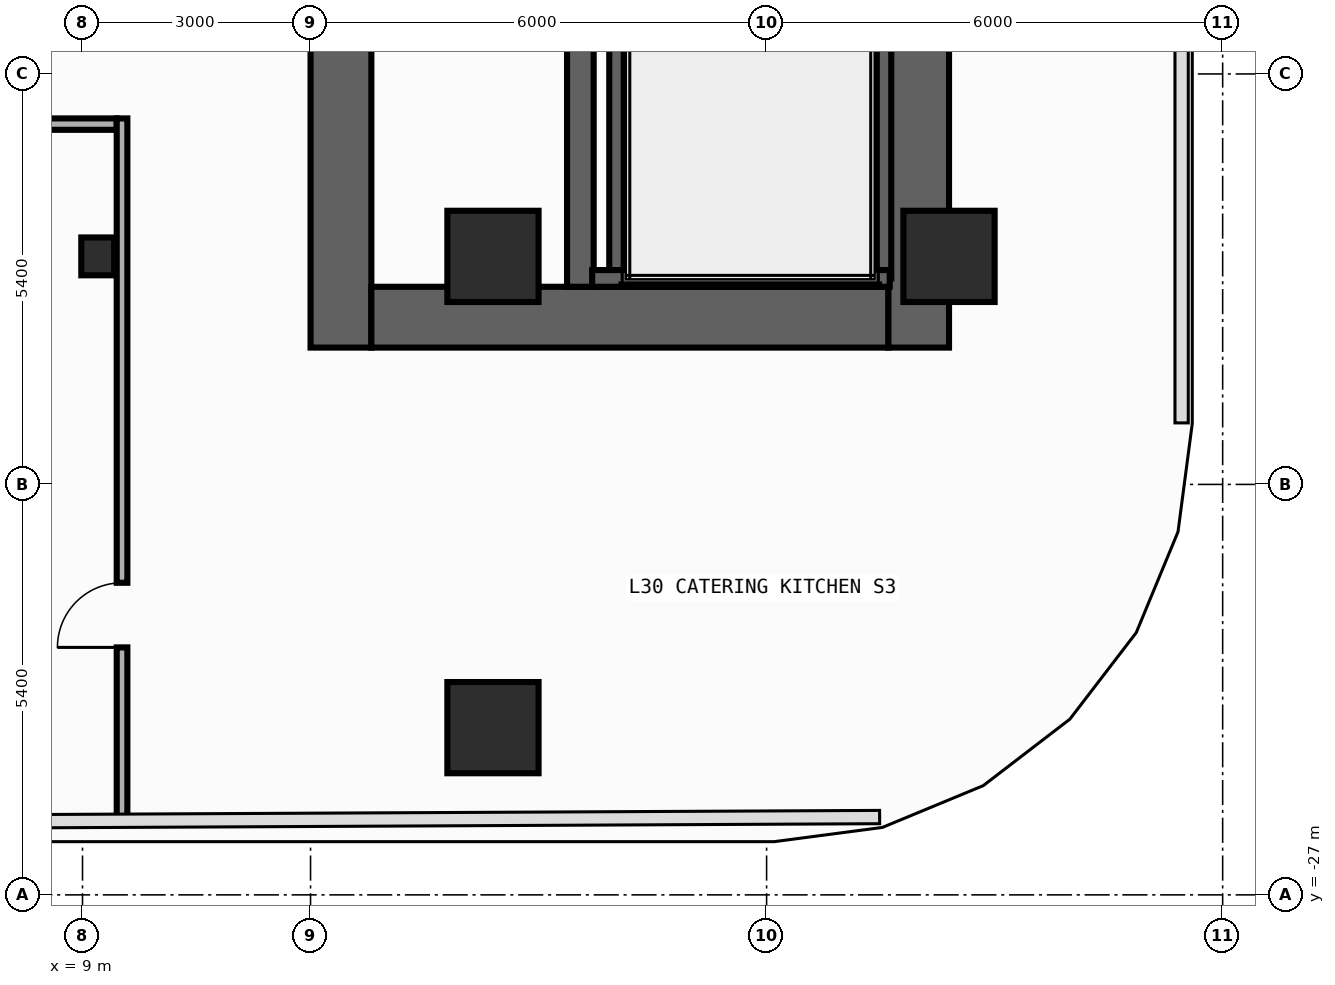
"""IFC4 building model, lengths in metres.
Left out: names, types, materials, properties, quantities, classifications, styles, units other than length and angle.
Written with IfcOpenShell. Run it as: python <this file> out.ifc"""

import sys

from ifc_helpers import new_model, si_unit, direction, frame, frame_2d, origin, origin_2d, place, context, subcontext, project, spatial, rectangle, i_section, extrude, element, fill, save


model = new_model("IFC4")
c1 = context("Model", 3, precision=1e-05, world=origin(), true_north=direction((0.0, 1.0)))
c2 = subcontext(c1, "Body", "Model", "MODEL_VIEW")
j1 = project(units=[si_unit("LENGTHUNIT", "METRE"), si_unit("PLANEANGLEUNIT", "RADIAN")], contexts=[c1])
p1 = place(None, origin())
s1 = spatial("IfcSite", under=j1, at=p1, CompositionType="ELEMENT")
p2 = place(p1, origin())
s2 = spatial("IfcBuilding", under=s1, at=p2, CompositionType="ELEMENT")
p3 = place(p2, frame((0.0, 0.0, 131.0)))
s3 = spatial("IfcBuildingStorey", under=s2, at=p3, CompositionType="ELEMENT", Elevation=131.0)
p4 = place(p3, frame((12.4, -19.8, 0.0), z_axis=(0.0, 0.0, 1.0), x_axis=(0.0, 1.0, 0.0)))
e1 = element("IfcWall", 1, at=p4, inside=s3, PredefinedType="SHEAR", context=c2, shape_type="SweptSolid", body=[
    extrude(rectangle(XDim=27.0, YDim=0.8, at=frame_2d((13.5, 0.0))), origin(), (0.0, 0.0, 1.0), 3.94),
])
p5 = place(p4, frame((23.05, 0.0, 0.0)))
e2 = element("IfcOpeningElement", 2, at=p5, cuts=e1, PredefinedType="OPENING", context=c2, shape_type="SweptSolid", body=[
    extrude(rectangle(XDim=1.1, YDim=2.2, at=frame_2d((0.55, 1.1))), frame((0.0, 0.41, 0.0), z_axis=(0.0, -1.0, 0.0), x_axis=(1.0, 0.0, 0.0)), (0.0, 0.0, 1.0), 0.82),
])
p6 = place(p4, frame((19.85, 0.0, 0.0)))
e3 = element("IfcOpeningElement", 3, at=p6, cuts=e1, PredefinedType="OPENING", context=c2, shape_type="SweptSolid", body=[
    extrude(rectangle(XDim=1.1, YDim=2.2, at=frame_2d((0.55, 1.1))), frame((0.0, 0.41, 0.0), z_axis=(0.0, -1.0, 0.0), x_axis=(1.0, 0.0, 0.0)), (0.0, 0.0, 1.0), 0.82),
])
p7 = place(p4, frame((16.65, 0.0, 0.0)))
e4 = element("IfcOpeningElement", 4, at=p7, cuts=e1, PredefinedType="OPENING", context=c2, shape_type="SweptSolid", body=[
    extrude(rectangle(XDim=1.1, YDim=2.2, at=frame_2d((0.55, 1.1))), frame((0.0, 0.41, 0.0), z_axis=(0.0, -1.0, 0.0), x_axis=(1.0, 0.0, 0.0)), (0.0, 0.0, 1.0), 0.82),
])
p8 = place(p4, frame((6.275, 0.0, 0.0)))
e5 = element("IfcOpeningElement", 5, at=p8, cuts=e1, PredefinedType="OPENING", context=c2, shape_type="SweptSolid", body=[
    extrude(rectangle(XDim=0.85, YDim=2.1, at=frame_2d((0.425, 1.05))), frame((0.0, 0.41, 0.0), z_axis=(0.0, -1.0, 0.0), x_axis=(1.0, 0.0, 0.0)), (0.0, 0.0, 1.0), 0.82),
])
p9 = place(p4, frame((8.575, 0.0, 0.0)))
e6 = element("IfcOpeningElement", 6, at=p9, cuts=e1, PredefinedType="OPENING", context=c2, shape_type="SweptSolid", body=[
    extrude(rectangle(XDim=0.85, YDim=2.1, at=frame_2d((0.425, 1.05))), frame((0.0, 0.41, 0.0), z_axis=(0.0, -1.0, 0.0), x_axis=(1.0, 0.0, 0.0)), (0.0, 0.0, 1.0), 0.82),
])
p10 = place(p4, frame((10.675, 0.0, 0.0)))
e7 = element("IfcOpeningElement", 7, at=p10, cuts=e1, PredefinedType="OPENING", context=c2, shape_type="SweptSolid", body=[
    extrude(rectangle(XDim=0.85, YDim=2.1, at=frame_2d((0.425, 1.05))), frame((0.0, 0.41, 0.0), z_axis=(0.0, -1.0, 0.0), x_axis=(1.0, 0.0, 0.0)), (0.0, 0.0, 1.0), 0.82),
])
p11 = place(p4, frame((12.725, 0.0, 0.0)))
e8 = element("IfcOpeningElement", 8, at=p11, cuts=e1, PredefinedType="OPENING", context=c2, shape_type="SweptSolid", body=[
    extrude(rectangle(XDim=1.15, YDim=2.2, at=frame_2d((0.575, 1.1))), frame((0.0, 0.41, 0.0), z_axis=(0.0, -1.0, 0.0), x_axis=(1.0, 0.0, 0.0)), (0.0, 0.0, 1.0), 0.82),
])
p12 = place(p4, frame((25.125, 0.0, 0.0)))
e9 = element("IfcOpeningElement", 9, at=p12, cuts=e1, PredefinedType="OPENING", context=c2, shape_type="SweptSolid", body=[
    extrude(rectangle(XDim=0.85, YDim=2.1, at=frame_2d((0.425, 1.05))), frame((0.0, 0.41, 0.0), z_axis=(0.0, -1.0, 0.0), x_axis=(1.0, 0.0, 0.0)), (0.0, 0.0, 1.0), 0.82),
])
p13 = place(p3, frame((20.0, -19.8, 0.0), z_axis=(0.0, 0.0, 1.0), x_axis=(0.0, 1.0, 0.0)))
e10 = element("IfcWall", 10, at=p13, inside=s3, PredefinedType="SHEAR", context=c2, shape_type="SweptSolid", body=[
    extrude(rectangle(XDim=27.0, YDim=0.8, at=frame_2d((13.5, 0.0))), origin(), (0.0, 0.0, 1.0), 3.94),
])
p14 = place(p3, frame((12.8, -19.4, 0.0), z_axis=(0.0, 0.0, 1.0), x_axis=(1.0, 0.0, 0.0)))
e11 = element("IfcWall", 11, at=p14, inside=s3, PredefinedType="SHEAR", context=c2, shape_type="SweptSolid", body=[
    extrude(rectangle(XDim=6.8, YDim=0.8, at=frame_2d((3.4, 0.0))), origin(), (0.0, 0.0, 1.0), 3.94),
])
p15 = place(p3, frame((15.55, -19.0, 0.0), z_axis=(0.0, 0.0, 1.0), x_axis=(0.0, 1.0, 0.0)))
e12 = element("IfcWall", 12, at=p15, inside=s3, PredefinedType="SHEAR", context=c2, shape_type="SweptSolid", body=[
    extrude(rectangle(XDim=25.4, YDim=0.35, at=frame_2d((12.7, 0.0))), origin(), (0.0, 0.0, 1.0), 3.94),
])
p16 = place(p15, frame((11.925, 0.0, 0.0)))
e13 = element("IfcOpeningElement", 13, at=p16, cuts=e12, PredefinedType="OPENING", context=c2, shape_type="SweptSolid", body=[
    extrude(rectangle(XDim=1.15, YDim=2.2, at=frame_2d((0.575, 1.1))), frame((0.0, 0.185, 0.0), z_axis=(0.0, -1.0, 0.0), x_axis=(1.0, 0.0, 0.0)), (0.0, 0.0, 1.0), 0.37),
])
p17 = place(p15, frame((24.325, 0.0, 0.0)))
e14 = element("IfcOpeningElement", 14, at=p17, cuts=e12, PredefinedType="OPENING", context=c2, shape_type="SweptSolid", body=[
    extrude(rectangle(XDim=0.85, YDim=2.1, at=frame_2d((0.425, 1.05))), frame((0.0, 0.185, 0.0), z_axis=(0.0, -1.0, 0.0), x_axis=(1.0, 0.0, 0.0)), (0.0, 0.0, 1.0), 0.37),
])
for number, where, z_axis, x_axis in (
    (15, (16.04, -18.89, 0.0), (0.0, 0.0, 1.0), (0.0, 1.0, 0.0)),
    (16, (19.53, -18.89, 0.0), (0.0, 0.0, 1.0), (0.0, 1.0, 0.0)),
):
    element("IfcWall", number, at=place(p3, frame(where, z_axis=z_axis, x_axis=x_axis)), inside=s3, PredefinedType="SHEAR", context=c2, shape_type="SweptSolid", body=[
        extrude(rectangle(XDim=11.3, YDim=0.22, at=frame_2d((5.65, 0.0))), origin(), (0.0, 0.0, 1.0), 3.94),
    ])
p18 = place(p3, frame((15.705, -18.89, 0.0), z_axis=(0.0, 0.0, 1.0), x_axis=(1.0, 0.0, 0.0)))
e17 = element("IfcWall", 17, at=p18, inside=s3, PredefinedType="SHEAR", context=c2, shape_type="SweptSolid", body=[
    extrude(rectangle(XDim=3.915, YDim=0.22, at=frame_2d((1.958, 0.0))), origin(), (0.0, 0.0, 1.0), 3.94),
])
p19 = place(p3, frame((9.2, -18.6, 0.0), z_axis=(0.0, 0.0, 1.0), x_axis=(1.0, 0.0, 0.0)))
e18 = element("IfcColumn", 18, at=p19, inside=s3, PredefinedType="COLUMN", context=c2, shape_type="SweptSolid", body=[
    extrude(i_section(OverallWidth=0.432, OverallDepth=0.498, WebThickness=0.045, FlangeThickness=0.07, FilletRadius=0.022, at=origin_2d()), origin(), (0.0, 0.0, 1.0), 4.2),
])
for number, where, z_axis, x_axis in (
    (19, (20.4, -18.6, 0.0), (0.0, 0.0, 1.0), (1.0, 0.0, 0.0)),
    (20, (14.4, -18.6, 0.0), (0.0, 0.0, 1.0), (1.0, 0.0, 0.0)),
    (21, (14.4, -24.8, 0.0), (0.0, 0.0, 1.0), (1.0, 0.0, 0.0)),
):
    element("IfcColumn", number, at=place(p3, frame(where, z_axis=z_axis, x_axis=x_axis)), inside=s3, PredefinedType="COLUMN", context=c2, shape_type="SweptSolid", body=[
        extrude(rectangle(XDim=1.2, YDim=1.2, at=origin_2d()), origin(), (0.0, 0.0, 1.0), 4.2),
    ])
p20 = place(p3, frame((-6.664, -16.86, 0.0), z_axis=(0.0, 0.0, 1.0), x_axis=(1.0, 0.0, 0.0)))
e22 = element("IfcWall", 22, at=p20, inside=s3, PredefinedType="PARTITIONING", context=c2, shape_type="SweptSolid", body=[
    extrude(rectangle(XDim=16.114, YDim=0.15, at=frame_2d((8.057, 0.0))), origin(), (0.0, 0.0, 1.0), 3.94),
])
p21 = place(p20, frame((13.343, 0.0, 0.0)))
e23 = element("IfcOpeningElement", 23, at=p21, cuts=e22, PredefinedType="OPENING", context=c2, shape_type="SweptSolid", body=[
    extrude(rectangle(XDim=0.9, YDim=2.15, at=frame_2d((0.45, 1.075))), frame((0.0, 0.085, 0.0), z_axis=(0.0, -1.0, 0.0), x_axis=(1.0, 0.0, 0.0)), (0.0, 0.0, 1.0), 0.17),
])
p22 = place(p3, frame((9.52, -26.02, 0.0), z_axis=(0.0, 0.0, 1.0), x_axis=(0.0, 1.0, 0.0)))
e24 = element("IfcWall", 24, at=p22, inside=s3, PredefinedType="PARTITIONING", context=c2, shape_type="SweptSolid", body=[
    extrude(rectangle(XDim=9.235, YDim=0.14, at=frame_2d((4.618, 0.0))), origin(), (0.0, 0.0, 1.0), 3.24),
])
p23 = place(p22, frame((2.276, 0.0, 0.0)))
e25 = element("IfcOpeningElement", 25, at=p23, cuts=e24, PredefinedType="OPENING", context=c2, shape_type="SweptSolid", body=[
    extrude(rectangle(XDim=0.85, YDim=2.1, at=frame_2d((0.425, 1.05))), frame((0.0, 0.08, 0.0), z_axis=(0.0, -1.0, 0.0), x_axis=(1.0, 0.0, 0.0)), (0.0, 0.0, 1.0), 0.16),
])
p24 = place(p23, origin())
e26 = element("IfcDoor", 26, at=p24, inside=s3, OperationType="SINGLE_SWING_LEFT", PredefinedType="DOOR", context=c2, shape_type="SweptSolid", body=[
    extrude(rectangle(XDim=0.85, YDim=2.1, at=frame_2d((0.425, 1.05))), frame((0.0, 0.025, 0.0), z_axis=(0.0, -1.0, 0.0), x_axis=(1.0, 0.0, 0.0)), (0.0, 0.0, 1.0), 0.05),
])
fill(e25, e26)
save(model, sys.argv[1])
